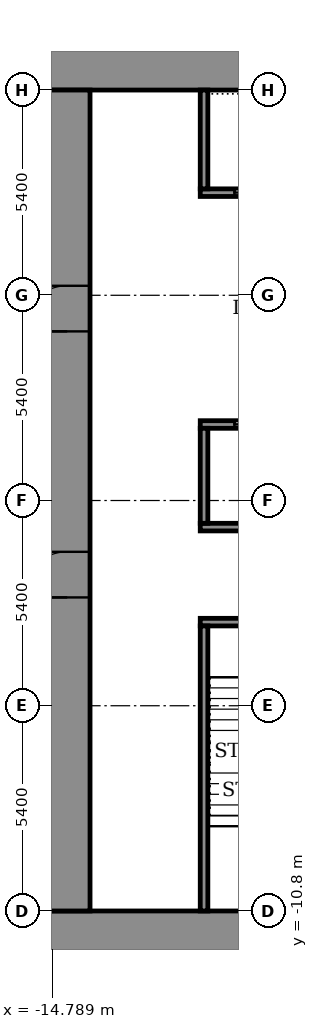
"""IFC4 building model, lengths in metres.
Left out: names, types, materials, properties, quantities, classifications, styles, units other than length and angle.
Written with IfcOpenShell. Run it as: python <this file> out.ifc"""

import sys

from ifc_helpers import new_model, si_unit, direction, frame, frame_2d, origin, place, context, subcontext, project, spatial, rectangle, extrude, element, fill, save


model = new_model("IFC4")
c1 = context("Model", 3, precision=1e-05, world=origin(), true_north=direction((0.0, 1.0)))
c2 = subcontext(c1, "Body", "Model", "MODEL_VIEW")
j1 = project(units=[si_unit("LENGTHUNIT", "METRE"), si_unit("PLANEANGLEUNIT", "RADIAN")], contexts=[c1])
p1 = place(None, origin())
s1 = spatial("IfcSite", under=j1, at=p1, CompositionType="ELEMENT")
p2 = place(p1, origin())
s2 = spatial("IfcBuilding", under=s1, at=p2, CompositionType="ELEMENT")
p3 = place(p2, frame((0.0, 0.0, 11.0)))
s3 = spatial("IfcBuildingStorey", under=s2, at=p3, CompositionType="ELEMENT", Elevation=11.0)
for number, where, z_axis, x_axis in (
    (1, (-15.0, -11.4, 0.0), (0.0, 0.0, 1.0), (1.0, 0.0, 0.0)),
    (2, (-15.0, 11.4, 0.0), (0.0, 0.0, 1.0), (1.0, 0.0, 0.0)),
):
    element("IfcWall", number, at=place(p3, frame(where, z_axis=z_axis, x_axis=x_axis)), inside=s3, PredefinedType="SHEAR", context=c2, shape_type="SweptSolid", body=[
        extrude(rectangle(XDim=30.0, YDim=1.2, at=frame_2d((15.0, 0.0))), origin(), (0.0, 0.0, 1.0), 5.0),
    ])
p4 = place(p3, frame((-14.4, -10.8, 0.0), z_axis=(0.0, 0.0, 1.0), x_axis=(0.0, 1.0, 0.0)))
e3 = element("IfcWall", 3, at=p4, inside=s3, PredefinedType="SHEAR", context=c2, shape_type="SweptSolid", body=[
    extrude(rectangle(XDim=21.6, YDim=1.2, at=frame_2d((10.8, 0.0))), origin(), (0.0, 0.0, 1.0), 5.0),
])
p5 = place(p4, frame((8.25, 0.0, 0.0)))
e4 = element("IfcOpeningElement", 4, at=p5, cuts=e3, PredefinedType="OPENING", context=c2, shape_type="SweptSolid", body=[
    extrude(rectangle(XDim=1.2, YDim=2.1, at=frame_2d((0.6, 1.05))), frame((0.0, 0.61, 0.0), z_axis=(0.0, -1.0, 0.0), x_axis=(1.0, 0.0, 0.0)), (0.0, 0.0, 1.0), 1.22),
])
p6 = place(p4, frame((15.25, 0.0, 0.0)))
e5 = element("IfcOpeningElement", 5, at=p6, cuts=e3, PredefinedType="OPENING", context=c2, shape_type="SweptSolid", body=[
    extrude(rectangle(XDim=1.2, YDim=2.1, at=frame_2d((0.6, 1.05))), frame((0.0, 0.61, 0.0), z_axis=(0.0, -1.0, 0.0), x_axis=(1.0, 0.0, 0.0)), (0.0, 0.0, 1.0), 1.22),
])
p7 = place(p3, frame((-10.9, -3.2, 0.0), z_axis=(0.0, 0.0, 1.0), x_axis=(1.0, 0.0, 0.0)))
e6 = element("IfcWall", 6, at=p7, inside=s3, PredefinedType="SHEAR", context=c2, shape_type="SweptSolid", body=[
    extrude(rectangle(XDim=21.8, YDim=0.2, at=frame_2d((10.9, 0.0))), origin(), (0.0, 0.0, 1.0), 4.45),
])
p8 = place(p7, frame((1.075, 0.0, 0.0)))
e7 = element("IfcOpeningElement", 7, at=p8, cuts=e6, PredefinedType="OPENING", context=c2, shape_type="SweptSolid", body=[
    extrude(rectangle(XDim=1.1, YDim=2.1, at=frame_2d((0.55, 1.05))), frame((0.0, 0.11, 0.0), z_axis=(0.0, -1.0, 0.0), x_axis=(1.0, 0.0, 0.0)), (0.0, 0.0, 1.0), 0.22),
])
p9 = place(p7, frame((10.325, 0.0, 0.0)))
e8 = element("IfcOpeningElement", 8, at=p9, cuts=e6, PredefinedType="OPENING", context=c2, shape_type="SweptSolid", body=[
    extrude(rectangle(XDim=1.1, YDim=2.1, at=frame_2d((0.55, 1.05))), frame((0.0, 0.11, 0.0), z_axis=(0.0, -1.0, 0.0), x_axis=(1.0, 0.0, 0.0)), (0.0, 0.0, 1.0), 0.22),
])
p10 = place(p7, frame((19.625, 0.0, 0.0)))
e9 = element("IfcOpeningElement", 9, at=p10, cuts=e6, PredefinedType="OPENING", context=c2, shape_type="SweptSolid", body=[
    extrude(rectangle(XDim=1.1, YDim=2.1, at=frame_2d((0.55, 1.05))), frame((0.0, 0.11, 0.0), z_axis=(0.0, -1.0, 0.0), x_axis=(1.0, 0.0, 0.0)), (0.0, 0.0, 1.0), 0.22),
])
p11 = place(p7, frame((5.7, 0.0, 0.0)))
e10 = element("IfcOpeningElement", 10, at=p11, cuts=e6, PredefinedType="OPENING", context=c2, shape_type="SweptSolid", body=[
    extrude(rectangle(XDim=1.1, YDim=2.1, at=frame_2d((0.55, 1.05))), frame((0.0, 0.11, 0.0), z_axis=(0.0, -1.0, 0.0), x_axis=(1.0, 0.0, 0.0)), (0.0, 0.0, 1.0), 0.22),
])
p12 = place(p7, frame((14.975, 0.0, 0.0)))
e11 = element("IfcOpeningElement", 11, at=p12, cuts=e6, PredefinedType="OPENING", context=c2, shape_type="SweptSolid", body=[
    extrude(rectangle(XDim=1.1, YDim=2.1, at=frame_2d((0.55, 1.05))), frame((0.0, 0.11, 0.0), z_axis=(0.0, -1.0, 0.0), x_axis=(1.0, 0.0, 0.0)), (0.0, 0.0, 1.0), 0.22),
])
p13 = place(p3, frame((-10.9, -0.7, 0.0), z_axis=(0.0, 0.0, 1.0), x_axis=(1.0, 0.0, 0.0)))
e12 = element("IfcWall", 12, at=p13, inside=s3, PredefinedType="SHEAR", context=c2, shape_type="SweptSolid", body=[
    extrude(rectangle(XDim=21.8, YDim=0.2, at=frame_2d((10.9, 0.0))), origin(), (0.0, 0.0, 1.0), 4.45),
])
p14 = place(p3, frame((-10.9, 2.0, 0.0), z_axis=(0.0, 0.0, 1.0), x_axis=(1.0, 0.0, 0.0)))
e13 = element("IfcWall", 13, at=p14, inside=s3, PredefinedType="SHEAR", context=c2, shape_type="SweptSolid", body=[
    extrude(rectangle(XDim=21.8, YDim=0.2, at=frame_2d((10.9, 0.0))), origin(), (0.0, 0.0, 1.0), 4.45),
])
p15 = place(p14, frame((0.9, 0.0, 0.0)))
e14 = element("IfcOpeningElement", 14, at=p15, cuts=e13, PredefinedType="OPENING", context=c2, shape_type="SweptSolid", body=[
    extrude(rectangle(XDim=1.1, YDim=2.1, at=frame_2d((0.55, 1.05))), frame((0.0, 0.11, 0.0), z_axis=(0.0, -1.0, 0.0), x_axis=(1.0, 0.0, 0.0)), (0.0, 0.0, 1.0), 0.22),
])
p16 = place(p14, frame((3.6, 0.0, 0.0)))
e15 = element("IfcOpeningElement", 15, at=p16, cuts=e13, PredefinedType="OPENING", context=c2, shape_type="SweptSolid", body=[
    extrude(rectangle(XDim=1.1, YDim=2.1, at=frame_2d((0.55, 1.05))), frame((0.0, 0.11, 0.0), z_axis=(0.0, -1.0, 0.0), x_axis=(1.0, 0.0, 0.0)), (0.0, 0.0, 1.0), 0.22),
])
p17 = place(p14, frame((6.3, 0.0, 0.0)))
e16 = element("IfcOpeningElement", 16, at=p17, cuts=e13, PredefinedType="OPENING", context=c2, shape_type="SweptSolid", body=[
    extrude(rectangle(XDim=1.1, YDim=2.1, at=frame_2d((0.55, 1.05))), frame((0.0, 0.11, 0.0), z_axis=(0.0, -1.0, 0.0), x_axis=(1.0, 0.0, 0.0)), (0.0, 0.0, 1.0), 0.22),
])
p18 = place(p14, frame((9.0, 0.0, 0.0)))
e17 = element("IfcOpeningElement", 17, at=p18, cuts=e13, PredefinedType="OPENING", context=c2, shape_type="SweptSolid", body=[
    extrude(rectangle(XDim=1.1, YDim=2.1, at=frame_2d((0.55, 1.05))), frame((0.0, 0.11, 0.0), z_axis=(0.0, -1.0, 0.0), x_axis=(1.0, 0.0, 0.0)), (0.0, 0.0, 1.0), 0.22),
])
p19 = place(p14, frame((11.7, 0.0, 0.0)))
e18 = element("IfcOpeningElement", 18, at=p19, cuts=e13, PredefinedType="OPENING", context=c2, shape_type="SweptSolid", body=[
    extrude(rectangle(XDim=1.1, YDim=2.1, at=frame_2d((0.55, 1.05))), frame((0.0, 0.11, 0.0), z_axis=(0.0, -1.0, 0.0), x_axis=(1.0, 0.0, 0.0)), (0.0, 0.0, 1.0), 0.22),
])
p20 = place(p14, frame((15.175, 0.0, 0.0)))
e19 = element("IfcOpeningElement", 19, at=p20, cuts=e13, PredefinedType="OPENING", context=c2, shape_type="SweptSolid", body=[
    extrude(rectangle(XDim=0.9, YDim=2.1, at=frame_2d((0.45, 1.05))), frame((0.0, 0.11, 0.0), z_axis=(0.0, -1.0, 0.0), x_axis=(1.0, 0.0, 0.0)), (0.0, 0.0, 1.0), 0.22),
])
p21 = place(p14, frame((19.225, 0.0, 0.0)))
e20 = element("IfcOpeningElement", 20, at=p21, cuts=e13, PredefinedType="OPENING", context=c2, shape_type="SweptSolid", body=[
    extrude(rectangle(XDim=0.9, YDim=2.1, at=frame_2d((0.45, 1.05))), frame((0.0, 0.11, 0.0), z_axis=(0.0, -1.0, 0.0), x_axis=(1.0, 0.0, 0.0)), (0.0, 0.0, 1.0), 0.22),
])
p22 = place(p3, frame((-10.9, 8.1, 0.0), z_axis=(0.0, 0.0, 1.0), x_axis=(1.0, 0.0, 0.0)))
e21 = element("IfcWall", 21, at=p22, inside=s3, PredefinedType="SHEAR", context=c2, shape_type="SweptSolid", body=[
    extrude(rectangle(XDim=21.8, YDim=0.2, at=frame_2d((10.9, 0.0))), origin(), (0.0, 0.0, 1.0), 4.45),
])
p23 = place(p22, frame((0.9, 0.0, 0.0)))
e22 = element("IfcOpeningElement", 22, at=p23, cuts=e21, PredefinedType="OPENING", context=c2, shape_type="SweptSolid", body=[
    extrude(rectangle(XDim=1.1, YDim=2.1, at=frame_2d((0.55, 1.05))), frame((0.0, 0.11, 0.0), z_axis=(0.0, -1.0, 0.0), x_axis=(1.0, 0.0, 0.0)), (0.0, 0.0, 1.0), 0.22),
])
p24 = place(p22, frame((3.6, 0.0, 0.0)))
e23 = element("IfcOpeningElement", 23, at=p24, cuts=e21, PredefinedType="OPENING", context=c2, shape_type="SweptSolid", body=[
    extrude(rectangle(XDim=1.1, YDim=2.1, at=frame_2d((0.55, 1.05))), frame((0.0, 0.11, 0.0), z_axis=(0.0, -1.0, 0.0), x_axis=(1.0, 0.0, 0.0)), (0.0, 0.0, 1.0), 0.22),
])
p25 = place(p22, frame((6.3, 0.0, 0.0)))
e24 = element("IfcOpeningElement", 24, at=p25, cuts=e21, PredefinedType="OPENING", context=c2, shape_type="SweptSolid", body=[
    extrude(rectangle(XDim=1.1, YDim=2.1, at=frame_2d((0.55, 1.05))), frame((0.0, 0.11, 0.0), z_axis=(0.0, -1.0, 0.0), x_axis=(1.0, 0.0, 0.0)), (0.0, 0.0, 1.0), 0.22),
])
p26 = place(p22, frame((9.0, 0.0, 0.0)))
e25 = element("IfcOpeningElement", 25, at=p26, cuts=e21, PredefinedType="OPENING", context=c2, shape_type="SweptSolid", body=[
    extrude(rectangle(XDim=1.1, YDim=2.1, at=frame_2d((0.55, 1.05))), frame((0.0, 0.11, 0.0), z_axis=(0.0, -1.0, 0.0), x_axis=(1.0, 0.0, 0.0)), (0.0, 0.0, 1.0), 0.22),
])
p27 = place(p22, frame((11.7, 0.0, 0.0)))
e26 = element("IfcOpeningElement", 26, at=p27, cuts=e21, PredefinedType="OPENING", context=c2, shape_type="SweptSolid", body=[
    extrude(rectangle(XDim=1.1, YDim=2.1, at=frame_2d((0.55, 1.05))), frame((0.0, 0.11, 0.0), z_axis=(0.0, -1.0, 0.0), x_axis=(1.0, 0.0, 0.0)), (0.0, 0.0, 1.0), 0.22),
])
p28 = place(p22, frame((15.175, 0.0, 0.0)))
e27 = element("IfcOpeningElement", 27, at=p28, cuts=e21, PredefinedType="OPENING", context=c2, shape_type="SweptSolid", body=[
    extrude(rectangle(XDim=0.9, YDim=2.1, at=frame_2d((0.45, 1.05))), frame((0.0, 0.11, 0.0), z_axis=(0.0, -1.0, 0.0), x_axis=(1.0, 0.0, 0.0)), (0.0, 0.0, 1.0), 0.22),
])
p29 = place(p22, frame((19.225, 0.0, 0.0)))
e28 = element("IfcOpeningElement", 28, at=p29, cuts=e21, PredefinedType="OPENING", context=c2, shape_type="SweptSolid", body=[
    extrude(rectangle(XDim=0.9, YDim=2.1, at=frame_2d((0.45, 1.05))), frame((0.0, 0.11, 0.0), z_axis=(0.0, -1.0, 0.0), x_axis=(1.0, 0.0, 0.0)), (0.0, 0.0, 1.0), 0.22),
])
p30 = place(p3, frame((-10.8, -10.8, 0.0), z_axis=(0.0, 0.0, 1.0), x_axis=(0.0, 1.0, 0.0)))
e29 = element("IfcWall", 29, at=p30, inside=s3, PredefinedType="SHEAR", context=c2, shape_type="SweptSolid", body=[
    extrude(rectangle(XDim=7.5, YDim=0.2, at=frame_2d((3.75, 0.0))), origin(), (0.0, 0.0, 1.0), 4.45),
])
p31 = place(p3, frame((-10.8, -0.6, 0.0), z_axis=(0.0, 0.0, 1.0), x_axis=(0.0, 1.0, 0.0)))
e30 = element("IfcWall", 30, at=p31, inside=s3, PredefinedType="SHEAR", context=c2, shape_type="SweptSolid", body=[
    extrude(rectangle(XDim=2.5, YDim=0.2, at=frame_2d((1.25, 0.0))), origin(), (0.0, 0.0, 1.0), 4.45),
])
p32 = place(p3, frame((-10.8, 8.2, 0.0), z_axis=(0.0, 0.0, 1.0), x_axis=(0.0, 1.0, 0.0)))
e31 = element("IfcWall", 31, at=p32, inside=s3, PredefinedType="SHEAR", context=c2, shape_type="SweptSolid", body=[
    extrude(rectangle(XDim=2.6, YDim=0.2, at=frame_2d((1.3, 0.0))), origin(), (0.0, 0.0, 1.0), 4.45),
])
p33 = place(p5, origin())
e32 = element("IfcDoor", 32, at=p33, inside=s3, OperationType="DOUBLE_DOOR_SINGLE_SWING", PredefinedType="DOOR", context=c2, shape_type="SweptSolid", body=[
    extrude(rectangle(XDim=1.2, YDim=2.1, at=frame_2d((0.6, 1.05))), frame((0.0, 0.025, 0.0), z_axis=(0.0, -1.0, 0.0), x_axis=(1.0, 0.0, 0.0)), (0.0, 0.0, 1.0), 0.05),
])
fill(e4, e32)
p34 = place(p6, origin())
e33 = element("IfcDoor", 33, at=p34, inside=s3, OperationType="DOUBLE_DOOR_SINGLE_SWING", PredefinedType="DOOR", context=c2, shape_type="SweptSolid", body=[
    extrude(rectangle(XDim=1.2, YDim=2.1, at=frame_2d((0.6, 1.05))), frame((0.0, 0.025, 0.0), z_axis=(0.0, -1.0, 0.0), x_axis=(1.0, 0.0, 0.0)), (0.0, 0.0, 1.0), 0.05),
])
fill(e5, e33)
p35 = place(p15, origin())
e34 = element("IfcDoor", 34, at=p35, inside=s3, OperationType="SLIDING_TO_LEFT", PredefinedType="DOOR", context=c2, shape_type="SweptSolid", body=[
    extrude(rectangle(XDim=1.1, YDim=2.1, at=frame_2d((0.55, 1.05))), frame((0.0, 0.025, 0.0), z_axis=(0.0, -1.0, 0.0), x_axis=(1.0, 0.0, 0.0)), (0.0, 0.0, 1.0), 0.05),
])
fill(e14, e34)
p36 = place(p23, origin())
e35 = element("IfcDoor", 35, at=p36, inside=s3, OperationType="SLIDING_TO_LEFT", PredefinedType="DOOR", context=c2, shape_type="SweptSolid", body=[
    extrude(rectangle(XDim=1.1, YDim=2.1, at=frame_2d((0.55, 1.05))), frame((0.0, 0.025, 0.0), z_axis=(0.0, -1.0, 0.0), x_axis=(1.0, 0.0, 0.0)), (0.0, 0.0, 1.0), 0.05),
])
fill(e22, e35)
save(model, sys.argv[1])
